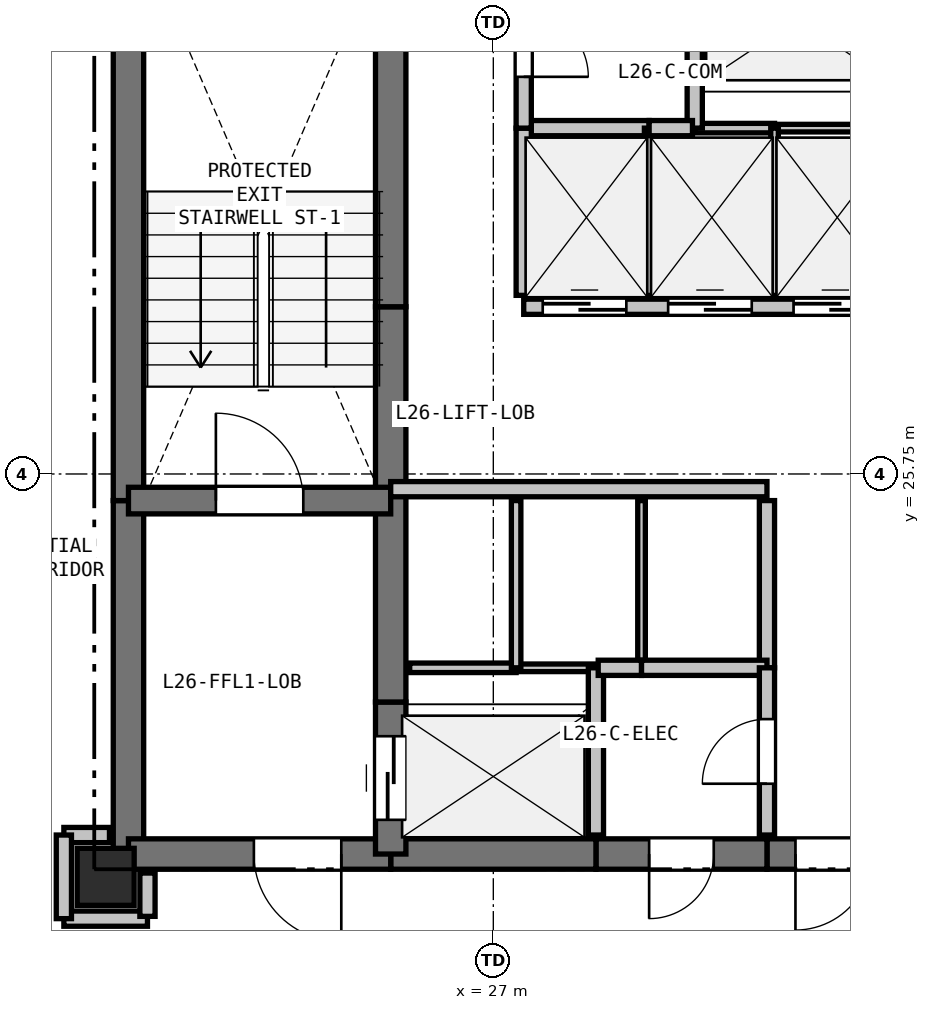
"""IFC4 building model, lengths in metres.
Left out: names, types, materials, properties, quantities, classifications, styles, units other than length and angle.
Written with IfcOpenShell. Run it as: python <this file> out.ifc"""

import sys

from ifc_helpers import new_model, si_unit, direction, frame, frame_2d, origin, origin_2d, place, context, subcontext, project, spatial, rectangle, extrude, element, fill, save


model = new_model("IFC4")
c1 = context("Model", 3, precision=1e-05, world=origin(), true_north=direction((0.0, 1.0)))
c2 = subcontext(c1, "Body", "Model", "MODEL_VIEW")
j1 = project(units=[si_unit("LENGTHUNIT", "METRE"), si_unit("PLANEANGLEUNIT", "RADIAN")], contexts=[c1])
p1 = place(None, origin())
s1 = spatial("IfcSite", under=j1, at=p1, CompositionType="ELEMENT")
p2 = place(p1, origin())
s2 = spatial("IfcBuilding", under=s1, at=p2, CompositionType="ELEMENT")
p3 = place(p2, frame((0.0, 0.0, 96.6)))
s3 = spatial("IfcBuildingStorey", under=s2, at=p3, CompositionType="ELEMENT", Elevation=96.6)
p4 = place(p3, frame((21.9, 20.45, 0.0), z_axis=(0.0, 0.0, 1.0), x_axis=(1.0, 0.0, 0.0)))
e1 = element("IfcColumn", 1, at=p4, inside=s3, PredefinedType="COLUMN", context=c2, shape_type="SweptSolid", body=[
    extrude(rectangle(XDim=0.75, YDim=0.75, at=origin_2d()), origin(), (0.0, 0.0, 1.0), 3.3),
])
p5 = place(p3, frame((22.2, 20.75, 0.0), z_axis=(0.0, 0.0, 1.0), x_axis=(0.0, 1.0, 0.0)))
e2 = element("IfcWall", 2, at=p5, inside=s3, PredefinedType="SHEAR", context=c2, shape_type="SweptSolid", body=[
    extrude(rectangle(XDim=4.65, YDim=0.4, at=frame_2d((2.325, 0.0))), origin(), (0.0, 0.0, 1.0), 3.05),
])
p6 = place(p3, frame((22.2, 25.4, 0.0), z_axis=(0.0, 0.0, 1.0), x_axis=(0.0, 1.0, 0.0)))
e3 = element("IfcWall", 3, at=p6, inside=s3, PredefinedType="SHEAR", context=c2, shape_type="SweptSolid", body=[
    extrude(rectangle(XDim=7.35, YDim=0.4, at=frame_2d((3.675, 0.0))), origin(), (0.0, 0.0, 1.0), 3.05),
])
p7 = place(p3, frame((32.35, 20.75, 0.0), z_axis=(0.0, 0.0, 1.0), x_axis=(-1.0, 0.0, 0.0)))
e4 = element("IfcWall", 4, at=p7, inside=s3, PredefinedType="SHEAR", context=c2, shape_type="SweptSolid", body=[
    extrude(rectangle(XDim=1.75, YDim=0.4, at=frame_2d((0.875, 0.0))), origin(), (0.0, 0.0, 1.0), 3.05),
])
p8 = place(p7, frame((0.375, 0.0, 0.0)))
e5 = element("IfcOpeningElement", 5, at=p8, cuts=e4, PredefinedType="OPENING", context=c2, shape_type="SweptSolid", body=[
    extrude(rectangle(XDim=1.0, YDim=2.15, at=frame_2d((0.5, 1.075))), frame((0.0, 0.21, 0.0), z_axis=(0.0, -1.0, 0.0), x_axis=(1.0, 0.0, 0.0)), (0.0, 0.0, 1.0), 0.42),
])
p9 = place(p3, frame((30.6, 20.75, 0.0), z_axis=(0.0, 0.0, 1.0), x_axis=(-1.0, 0.0, 0.0)))
e6 = element("IfcWall", 6, at=p9, inside=s3, PredefinedType="SHEAR", context=c2, shape_type="SweptSolid", body=[
    extrude(rectangle(XDim=2.25, YDim=0.4, at=frame_2d((1.125, 0.0))), origin(), (0.0, 0.0, 1.0), 3.05),
])
p10 = place(p9, frame((0.7, 0.0, 0.0)))
e7 = element("IfcOpeningElement", 7, at=p10, cuts=e6, PredefinedType="OPENING", context=c2, shape_type="SweptSolid", body=[
    extrude(rectangle(XDim=0.85, YDim=2.1, at=frame_2d((0.425, 1.05))), frame((0.0, 0.21, 0.0), z_axis=(0.0, -1.0, 0.0), x_axis=(1.0, 0.0, 0.0)), (0.0, 0.0, 1.0), 0.42),
])
p11 = place(p3, frame((28.35, 20.75, 0.0), z_axis=(0.0, 0.0, 1.0), x_axis=(-1.0, 0.0, 0.0)))
e8 = element("IfcWall", 8, at=p11, inside=s3, PredefinedType="SHEAR", context=c2, shape_type="SweptSolid", body=[
    extrude(rectangle(XDim=2.7, YDim=0.4, at=frame_2d((1.35, 0.0))), origin(), (0.0, 0.0, 1.0), 3.05),
])
p12 = place(p3, frame((25.65, 20.75, 0.0), z_axis=(0.0, 0.0, 1.0), x_axis=(-1.0, 0.0, 0.0)))
e9 = element("IfcWall", 9, at=p12, inside=s3, PredefinedType="SHEAR", context=c2, shape_type="SweptSolid", body=[
    extrude(rectangle(XDim=3.45, YDim=0.4, at=frame_2d((1.725, 0.0))), origin(), (0.0, 0.0, 1.0), 3.05),
])
p13 = place(p12, frame((0.65, 0.0, 0.0)))
e10 = element("IfcOpeningElement", 10, at=p13, cuts=e9, PredefinedType="OPENING", context=c2, shape_type="SweptSolid", body=[
    extrude(rectangle(XDim=1.15, YDim=2.15, at=frame_2d((0.575, 1.075))), frame((0.0, 0.21, 0.0), z_axis=(0.0, -1.0, 0.0), x_axis=(1.0, 0.0, 0.0)), (0.0, 0.0, 1.0), 0.42),
])
p14 = place(p3, frame((25.65, 20.75, 0.0), z_axis=(0.0, 0.0, 1.0), x_axis=(0.0, 1.0, 0.0)))
e11 = element("IfcWall", 11, at=p14, inside=s3, PredefinedType="SHEAR", context=c2, shape_type="SweptSolid", body=[
    extrude(rectangle(XDim=2.0, YDim=0.4, at=frame_2d((1.0, 0.0))), origin(), (0.0, 0.0, 1.0), 3.05),
])
p15 = place(p14, frame((0.45, 0.0, 0.0)))
e12 = element("IfcOpeningElement", 12, at=p15, cuts=e11, PredefinedType="OPENING", context=c2, shape_type="SweptSolid", body=[
    extrude(rectangle(XDim=1.1, YDim=2.15, at=frame_2d((0.55, 1.075))), frame((0.0, 0.21, 0.0), z_axis=(0.0, -1.0, 0.0), x_axis=(1.0, 0.0, 0.0)), (0.0, 0.0, 1.0), 0.42),
])
p16 = place(p3, frame((25.65, 22.75, 0.0), z_axis=(0.0, 0.0, 1.0), x_axis=(0.0, 1.0, 0.0)))
e13 = element("IfcWall", 13, at=p16, inside=s3, PredefinedType="SHEAR", context=c2, shape_type="SweptSolid", body=[
    extrude(rectangle(XDim=2.8, YDim=0.4, at=frame_2d((1.4, 0.0))), origin(), (0.0, 0.0, 1.0), 3.05),
])
p17 = place(p3, frame((25.65, 25.55, 0.0), z_axis=(0.0, 0.0, 1.0), x_axis=(0.0, 1.0, 0.0)))
e14 = element("IfcWall", 14, at=p17, inside=s3, PredefinedType="SHEAR", context=c2, shape_type="SweptSolid", body=[
    extrude(rectangle(XDim=2.4, YDim=0.4, at=frame_2d((1.2, 0.0))), origin(), (0.0, 0.0, 1.0), 3.05),
])
p18 = place(p3, frame((25.65, 27.95, 0.0), z_axis=(0.0, 0.0, 1.0), x_axis=(0.0, 1.0, 0.0)))
e15 = element("IfcWall", 15, at=p18, inside=s3, PredefinedType="SHEAR", context=c2, shape_type="SweptSolid", body=[
    extrude(rectangle(XDim=4.8, YDim=0.4, at=frame_2d((2.4, 0.0))), origin(), (0.0, 0.0, 1.0), 3.05),
])
p19 = place(p3, frame((22.2, 25.4, 0.0), z_axis=(0.0, 0.0, 1.0), x_axis=(1.0, 0.0, 0.0)))
e16 = element("IfcWall", 16, at=p19, inside=s3, PredefinedType="SHEAR", context=c2, shape_type="SweptSolid", body=[
    extrude(rectangle(XDim=3.45, YDim=0.35, at=frame_2d((1.725, 0.0))), origin(), (0.0, 0.0, 1.0), 3.05),
])
p20 = place(p19, frame((1.15, 0.0, 0.0)))
e17 = element("IfcOpeningElement", 17, at=p20, cuts=e16, PredefinedType="OPENING", context=c2, shape_type="SweptSolid", body=[
    extrude(rectangle(XDim=1.15, YDim=2.15, at=frame_2d((0.575, 1.075))), frame((0.0, 0.185, 0.0), z_axis=(0.0, -1.0, 0.0), x_axis=(1.0, 0.0, 0.0)), (0.0, 0.0, 1.0), 0.37),
])
p21 = place(p3, frame((25.65, 25.55, 0.0), z_axis=(0.0, 0.0, 1.0), x_axis=(1.0, 0.0, 0.0)))
e18 = element("IfcWall", 18, at=p21, inside=s3, PredefinedType="PARTITIONING", context=c2, shape_type="SweptSolid", body=[
    extrude(rectangle(XDim=4.95, YDim=0.2, at=frame_2d((2.475, 0.0))), origin(), (0.0, 0.0, 1.0), 3.05),
])
p22 = place(p3, frame((27.4, 27.95, 0.0), z_axis=(0.0, 0.0, 1.0), x_axis=(1.0, 0.0, 0.0)))
e19 = element("IfcWall", 19, at=p22, inside=s3, PredefinedType="PARTITIONING", context=c2, shape_type="SweptSolid", body=[
    extrude(rectangle(XDim=4.95, YDim=0.2, at=frame_2d((2.475, 0.0))), origin(), (0.0, 0.0, 1.0), 3.05),
])
p23 = place(p22, frame((0.25, 0.0, 0.0)))
e20 = element("IfcOpeningElement", 20, at=p23, cuts=e19, PredefinedType="OPENING", context=c2, shape_type="SweptSolid", body=[
    extrude(rectangle(XDim=1.1, YDim=2.15, at=frame_2d((0.55, 1.075))), frame((0.0, 0.11, 0.0), z_axis=(0.0, -1.0, 0.0), x_axis=(1.0, 0.0, 0.0)), (0.0, 0.0, 1.0), 0.22),
])
p24 = place(p22, frame((1.9, 0.0, 0.0)))
e21 = element("IfcOpeningElement", 21, at=p24, cuts=e19, PredefinedType="OPENING", context=c2, shape_type="SweptSolid", body=[
    extrude(rectangle(XDim=1.1, YDim=2.15, at=frame_2d((0.55, 1.075))), frame((0.0, 0.11, 0.0), z_axis=(0.0, -1.0, 0.0), x_axis=(1.0, 0.0, 0.0)), (0.0, 0.0, 1.0), 0.22),
])
p25 = place(p22, frame((3.55, 0.0, 0.0)))
e22 = element("IfcOpeningElement", 22, at=p25, cuts=e19, PredefinedType="OPENING", context=c2, shape_type="SweptSolid", body=[
    extrude(rectangle(XDim=1.1, YDim=2.15, at=frame_2d((0.55, 1.075))), frame((0.0, 0.11, 0.0), z_axis=(0.0, -1.0, 0.0), x_axis=(1.0, 0.0, 0.0)), (0.0, 0.0, 1.0), 0.22),
])
p26 = place(p3, frame((25.9, 23.2, 0.0), z_axis=(0.0, 0.0, 1.0), x_axis=(1.0, 0.0, 0.0)))
e23 = element("IfcWall", 23, at=p26, inside=s3, PredefinedType="PARTITIONING", context=c2, shape_type="SweptSolid", body=[
    extrude(rectangle(XDim=1.4, YDim=0.125, at=frame_2d((0.7, 0.0))), origin(), (0.0, 0.0, 1.0), 3.05),
])
p27 = place(p3, frame((27.3, 23.2, 0.0), z_axis=(0.0, 0.0, 1.0), x_axis=(1.0, 0.0, 0.0)))
e24 = element("IfcWall", 24, at=p27, inside=s3, PredefinedType="PARTITIONING", context=c2, shape_type="SweptSolid", body=[
    extrude(rectangle(XDim=1.05, YDim=0.1, at=frame_2d((0.525, 0.0))), origin(), (0.0, 0.0, 1.0), 3.05),
])
p28 = place(p3, frame((28.35, 23.2, 0.0), z_axis=(0.0, 0.0, 1.0), x_axis=(0.0, -1.0, 0.0)))
e25 = element("IfcWall", 25, at=p28, inside=s3, PredefinedType="PARTITIONING", context=c2, shape_type="SweptSolid", body=[
    extrude(rectangle(XDim=2.2, YDim=0.2, at=frame_2d((1.1, 0.0))), origin(), (0.0, 0.0, 1.0), 3.05),
])
p29 = place(p3, frame((32.1, 30.3, 0.0), z_axis=(0.0, 0.0, 1.0), x_axis=(-1.0, 0.0, 0.0)))
e26 = element("IfcWall", 26, at=p29, inside=s3, PredefinedType="PARTITIONING", context=c2, shape_type="SweptSolid", body=[
    extrude(rectangle(XDim=1.4, YDim=0.1, at=frame_2d((0.7, 0.0))), origin(), (0.0, 0.0, 1.0), 3.05),
])
p30 = place(p3, frame((30.7, 30.3, 0.0), z_axis=(0.0, 0.0, 1.0), x_axis=(-1.0, 0.0, 0.0)))
e27 = element("IfcWall", 27, at=p30, inside=s3, PredefinedType="PARTITIONING", context=c2, shape_type="SweptSolid", body=[
    extrude(rectangle(XDim=1.05, YDim=0.125, at=frame_2d((0.525, 0.0))), origin(), (0.0, 0.0, 1.0), 3.05),
])
p31 = place(p3, frame((29.65, 30.3, 0.0), z_axis=(0.0, 0.0, 1.0), x_axis=(0.0, 1.0, 0.0)))
e28 = element("IfcWall", 28, at=p31, inside=s3, PredefinedType="PARTITIONING", context=c2, shape_type="SweptSolid", body=[
    extrude(rectangle(XDim=2.2, YDim=0.2, at=frame_2d((1.1, 0.0))), origin(), (0.0, 0.0, 1.0), 3.05),
])
p32 = place(p3, frame((27.3, 25.4, 0.0), z_axis=(0.0, 0.0, 1.0), x_axis=(0.0, -1.0, 0.0)))
e29 = element("IfcWall", 29, at=p32, inside=s3, PredefinedType="PARTITIONING", context=c2, shape_type="SweptSolid", body=[
    extrude(rectangle(XDim=2.2, YDim=0.125, at=frame_2d((1.1, 0.0))), origin(), (0.0, 0.0, 1.0), 3.05),
])
p33 = place(p3, frame((28.95, 25.4, 0.0), z_axis=(0.0, 0.0, 1.0), x_axis=(0.0, -1.0, 0.0)))
e30 = element("IfcWall", 30, at=p33, inside=s3, PredefinedType="PARTITIONING", context=c2, shape_type="SweptSolid", body=[
    extrude(rectangle(XDim=2.2, YDim=0.1, at=frame_2d((1.1, 0.0))), origin(), (0.0, 0.0, 1.0), 3.05),
])
p34 = place(p3, frame((28.95, 23.2, 0.0), z_axis=(0.0, 0.0, 1.0), x_axis=(-1.0, 0.0, 0.0)))
e31 = element("IfcWall", 31, at=p34, inside=s3, PredefinedType="PARTITIONING", context=c2, shape_type="SweptSolid", body=[
    extrude(rectangle(XDim=0.57, YDim=0.2, at=frame_2d((0.285, 0.0))), origin(), (0.0, 0.0, 1.0), 3.05),
])
p35 = place(p3, frame((30.6, 25.4, 0.0), z_axis=(0.0, 0.0, 1.0), x_axis=(0.0, -1.0, 0.0)))
e32 = element("IfcWall", 32, at=p35, inside=s3, PredefinedType="PARTITIONING", context=c2, shape_type="SweptSolid", body=[
    extrude(rectangle(XDim=2.2, YDim=0.2, at=frame_2d((1.1, 0.0))), origin(), (0.0, 0.0, 1.0), 3.05),
])
for number, where, z_axis, x_axis in (
    (33, (30.6, 23.2, 0.0), (0.0, 0.0, 1.0), (-1.0, 0.0, 0.0)),
    (34, (27.4, 30.3, 0.0), (0.0, 0.0, 1.0), (1.0, 0.0, 0.0)),
):
    element("IfcWall", number, at=place(p3, frame(where, z_axis=z_axis, x_axis=x_axis)), inside=s3, PredefinedType="PARTITIONING", context=c2, shape_type="SweptSolid", body=[
        extrude(rectangle(XDim=1.65, YDim=0.2, at=frame_2d((0.825, 0.0))), origin(), (0.0, 0.0, 1.0), 3.05),
    ])
p36 = place(p3, frame((29.05, 30.3, 0.0), z_axis=(0.0, 0.0, 1.0), x_axis=(0.0, -1.0, 0.0)))
e35 = element("IfcWall", 35, at=p36, inside=s3, PredefinedType="PARTITIONING", context=c2, shape_type="SweptSolid", body=[
    extrude(rectangle(XDim=2.2, YDim=0.125, at=frame_2d((1.1, 0.0))), origin(), (0.0, 0.0, 1.0), 3.05),
])
p37 = place(p3, frame((27.4, 28.1, 0.0), z_axis=(0.0, 0.0, 1.0), x_axis=(0.0, 1.0, 0.0)))
e36 = element("IfcWall", 36, at=p37, inside=s3, PredefinedType="PARTITIONING", context=c2, shape_type="SweptSolid", body=[
    extrude(rectangle(XDim=2.2, YDim=0.2, at=frame_2d((1.1, 0.0))), origin(), (0.0, 0.0, 1.0), 3.05),
])
p38 = place(p3, frame((29.05, 30.3, 0.0), z_axis=(0.0, 0.0, 1.0), x_axis=(1.0, 0.0, 0.0)))
e37 = element("IfcWall", 37, at=p38, inside=s3, PredefinedType="PARTITIONING", context=c2, shape_type="SweptSolid", body=[
    extrude(rectangle(XDim=0.57, YDim=0.2, at=frame_2d((0.285, 0.0))), origin(), (0.0, 0.0, 1.0), 3.05),
])
p39 = place(p3, frame((30.7, 30.3, 0.0), z_axis=(0.0, 0.0, 1.0), x_axis=(0.0, -1.0, 0.0)))
e38 = element("IfcWall", 38, at=p39, inside=s3, PredefinedType="PARTITIONING", context=c2, shape_type="SweptSolid", body=[
    extrude(rectangle(XDim=2.2, YDim=0.1, at=frame_2d((1.1, 0.0))), origin(), (0.0, 0.0, 1.0), 3.05),
])
p40 = place(p3, frame((30.6, 21.0, 0.0), z_axis=(0.0, 0.0, 1.0), x_axis=(0.0, 1.0, 0.0)))
e39 = element("IfcWall", 39, at=p40, inside=s3, PredefinedType="PARTITIONING", context=c2, shape_type="SweptSolid", body=[
    extrude(rectangle(XDim=2.2, YDim=0.2, at=frame_2d((1.1, 0.0))), origin(), (0.0, 0.0, 1.0), 3.05),
])
p41 = place(p40, frame((0.675, 0.0, 0.0)))
e40 = element("IfcOpeningElement", 40, at=p41, cuts=e39, PredefinedType="OPENING", context=c2, shape_type="SweptSolid", body=[
    extrude(rectangle(XDim=0.85, YDim=2.1, at=frame_2d((0.425, 1.05))), frame((0.0, 0.11, 0.0), z_axis=(0.0, -1.0, 0.0), x_axis=(1.0, 0.0, 0.0)), (0.0, 0.0, 1.0), 0.22),
])
p42 = place(p3, frame((27.4, 32.5, 0.0), z_axis=(0.0, 0.0, 1.0), x_axis=(0.0, -1.0, 0.0)))
e41 = element("IfcWall", 41, at=p42, inside=s3, PredefinedType="PARTITIONING", context=c2, shape_type="SweptSolid", body=[
    extrude(rectangle(XDim=2.2, YDim=0.2, at=frame_2d((1.1, 0.0))), origin(), (0.0, 0.0, 1.0), 3.05),
])
p43 = place(p42, frame((0.675, 0.0, 0.0)))
e42 = element("IfcOpeningElement", 42, at=p43, cuts=e41, PredefinedType="OPENING", context=c2, shape_type="SweptSolid", body=[
    extrude(rectangle(XDim=0.85, YDim=2.1, at=frame_2d((0.425, 1.05))), frame((0.0, 0.11, 0.0), z_axis=(0.0, -1.0, 0.0), x_axis=(1.0, 0.0, 0.0)), (0.0, 0.0, 1.0), 0.22),
])
p44 = place(p3, frame((21.35, 19.9, 0.0), z_axis=(0.0, 0.0, 1.0), x_axis=(1.0, 0.0, 0.0)))
e43 = element("IfcWall", 43, at=p44, inside=s3, PredefinedType="PARTITIONING", context=c2, shape_type="SweptSolid", body=[
    extrude(rectangle(XDim=1.1, YDim=0.2, at=frame_2d((0.55, 0.0))), origin(), (0.0, 0.0, 1.0), 2.423),
])
p45 = place(p3, frame((22.45, 19.93, 0.0), z_axis=(0.0, 0.0, 1.0), x_axis=(0.0, 1.0, 0.0)))
e44 = element("IfcWall", 44, at=p45, inside=s3, PredefinedType="PARTITIONING", context=c2, shape_type="SweptSolid", body=[
    extrude(rectangle(XDim=0.57, YDim=0.2, at=frame_2d((0.285, 0.0))), origin(), (0.0, 0.0, 1.0), 2.423),
])
p46 = place(p3, frame((21.95, 21.0, 0.0), z_axis=(0.0, 0.0, 1.0), x_axis=(-1.0, 0.0, 0.0)))
e45 = element("IfcWall", 45, at=p46, inside=s3, PredefinedType="PARTITIONING", context=c2, shape_type="SweptSolid", body=[
    extrude(rectangle(XDim=0.6, YDim=0.2, at=frame_2d((0.3, 0.0))), origin(), (0.0, 0.0, 1.0), 2.498),
])
p47 = place(p3, frame((21.35, 21.0, 0.0), z_axis=(0.0, 0.0, 1.0), x_axis=(0.0, -1.0, 0.0)))
e46 = element("IfcWall", 46, at=p47, inside=s3, PredefinedType="PARTITIONING", context=c2, shape_type="SweptSolid", body=[
    extrude(rectangle(XDim=1.1, YDim=0.2, at=frame_2d((0.55, 0.0))), origin(), (0.0, 0.0, 1.0), 2.423),
])
p48 = place(p23, origin())
e47 = element("IfcDoor", 47, at=p48, inside=s3, OperationType="SLIDING_TO_LEFT", PredefinedType="DOOR", context=c2, shape_type="SweptSolid", body=[
    extrude(rectangle(XDim=1.1, YDim=2.15, at=frame_2d((0.55, 1.075))), frame((0.0, 0.025, 0.0), z_axis=(0.0, -1.0, 0.0), x_axis=(1.0, 0.0, 0.0)), (0.0, 0.0, 1.0), 0.05),
])
fill(e20, e47)
p49 = place(p24, origin())
e48 = element("IfcDoor", 48, at=p49, inside=s3, OperationType="SLIDING_TO_LEFT", PredefinedType="DOOR", context=c2, shape_type="SweptSolid", body=[
    extrude(rectangle(XDim=1.1, YDim=2.15, at=frame_2d((0.55, 1.075))), frame((0.0, 0.025, 0.0), z_axis=(0.0, -1.0, 0.0), x_axis=(1.0, 0.0, 0.0)), (0.0, 0.0, 1.0), 0.05),
])
fill(e21, e48)
p50 = place(p25, origin())
e49 = element("IfcDoor", 49, at=p50, inside=s3, OperationType="SLIDING_TO_LEFT", PredefinedType="DOOR", context=c2, shape_type="SweptSolid", body=[
    extrude(rectangle(XDim=1.1, YDim=2.15, at=frame_2d((0.55, 1.075))), frame((0.0, 0.025, 0.0), z_axis=(0.0, -1.0, 0.0), x_axis=(1.0, 0.0, 0.0)), (0.0, 0.0, 1.0), 0.05),
])
fill(e22, e49)
p51 = place(p8, origin())
e50 = element("IfcDoor", 50, at=p51, inside=s3, OperationType="SINGLE_SWING_RIGHT", PredefinedType="DOOR", context=c2, shape_type="SweptSolid", body=[
    extrude(rectangle(XDim=1.0, YDim=2.15, at=frame_2d((0.5, 1.075))), frame((0.0, 0.025, 0.0), z_axis=(0.0, -1.0, 0.0), x_axis=(1.0, 0.0, 0.0)), (0.0, 0.0, 1.0), 0.05),
])
fill(e5, e50)
p52 = place(p15, origin())
e51 = element("IfcDoor", 51, at=p52, inside=s3, OperationType="SLIDING_TO_LEFT", PredefinedType="DOOR", context=c2, shape_type="SweptSolid", body=[
    extrude(rectangle(XDim=1.1, YDim=2.15, at=frame_2d((0.55, 1.075))), frame((0.0, 0.025, 0.0), z_axis=(0.0, -1.0, 0.0), x_axis=(1.0, 0.0, 0.0)), (0.0, 0.0, 1.0), 0.05),
])
fill(e12, e51)
p53 = place(p20, origin())
e52 = element("IfcDoor", 52, at=p53, inside=s3, OperationType="SINGLE_SWING_LEFT", PredefinedType="DOOR", context=c2, shape_type="SweptSolid", body=[
    extrude(rectangle(XDim=1.15, YDim=2.15, at=frame_2d((0.575, 1.075))), frame((0.0, 0.025, 0.0), z_axis=(0.0, -1.0, 0.0), x_axis=(1.0, 0.0, 0.0)), (0.0, 0.0, 1.0), 0.05),
])
fill(e17, e52)
p54 = place(p13, origin())
e53 = element("IfcDoor", 53, at=p54, inside=s3, OperationType="SINGLE_SWING_LEFT", PredefinedType="DOOR", context=c2, shape_type="SweptSolid", body=[
    extrude(rectangle(XDim=1.15, YDim=2.15, at=frame_2d((0.575, 1.075))), frame((0.0, 0.025, 0.0), z_axis=(0.0, -1.0, 0.0), x_axis=(1.0, 0.0, 0.0)), (0.0, 0.0, 1.0), 0.05),
])
fill(e10, e53)
p55 = place(p41, origin())
e54 = element("IfcDoor", 54, at=p55, inside=s3, OperationType="SINGLE_SWING_LEFT", PredefinedType="DOOR", context=c2, shape_type="SweptSolid", body=[
    extrude(rectangle(XDim=0.85, YDim=2.1, at=frame_2d((0.425, 1.05))), frame((0.0, 0.025, 0.0), z_axis=(0.0, -1.0, 0.0), x_axis=(1.0, 0.0, 0.0)), (0.0, 0.0, 1.0), 0.05),
])
fill(e40, e54)
p56 = place(p43, origin())
e55 = element("IfcDoor", 55, at=p56, inside=s3, OperationType="SINGLE_SWING_RIGHT", PredefinedType="DOOR", context=c2, shape_type="SweptSolid", body=[
    extrude(rectangle(XDim=0.85, YDim=2.1, at=frame_2d((0.425, 1.05))), frame((0.0, 0.025, 0.0), z_axis=(0.0, -1.0, 0.0), x_axis=(1.0, 0.0, 0.0)), (0.0, 0.0, 1.0), 0.05),
])
fill(e42, e55)
p57 = place(p10, origin())
e56 = element("IfcDoor", 56, at=p57, inside=s3, OperationType="SINGLE_SWING_RIGHT", PredefinedType="DOOR", context=c2, shape_type="SweptSolid", body=[
    extrude(rectangle(XDim=0.85, YDim=2.1, at=frame_2d((0.425, 1.05))), frame((0.0, 0.025, 0.0), z_axis=(0.0, -1.0, 0.0), x_axis=(1.0, 0.0, 0.0)), (0.0, 0.0, 1.0), 0.05),
])
fill(e7, e56)
save(model, sys.argv[1])
